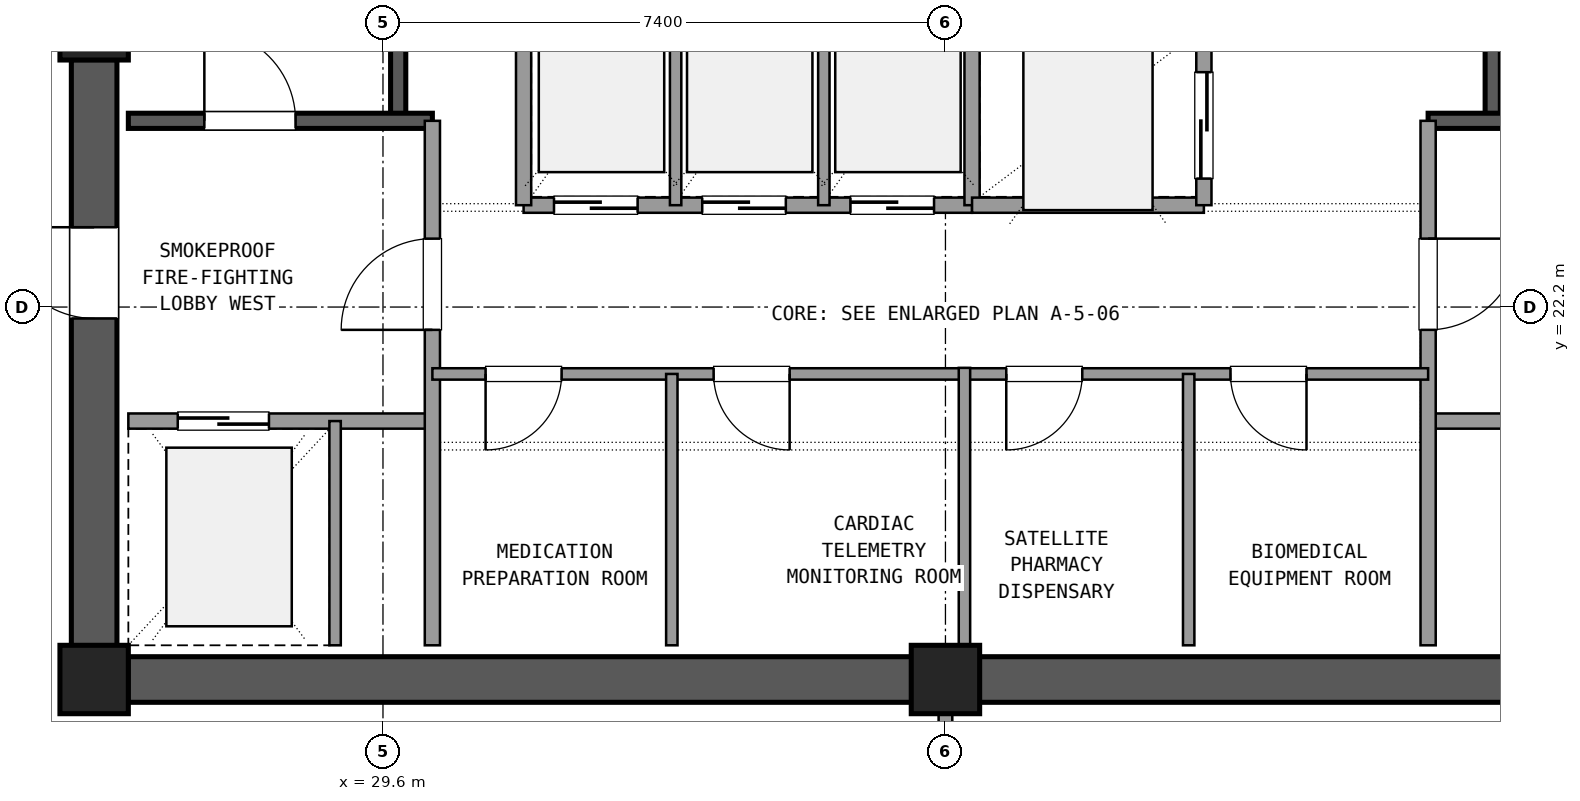
"""IFC4 building model, lengths in metres.
Left out: names, types, materials, properties, quantities, classifications, styles, units other than length and angle.
Written with IfcOpenShell. Run it as: python <this file> out.ifc"""

import sys

from ifc_helpers import new_model, si_unit, direction, frame, frame_2d, origin, origin_2d, place, context, subcontext, project, spatial, rectangle, extrude, element, fill, save


model = new_model("IFC4")
c1 = context("Model", 3, precision=1e-05, world=origin(), true_north=direction((0.0, 1.0)))
c2 = subcontext(c1, "Body", "Model", "MODEL_VIEW")
j1 = project(units=[si_unit("LENGTHUNIT", "METRE"), si_unit("PLANEANGLEUNIT", "RADIAN")], contexts=[c1])
p1 = place(None, origin())
s1 = spatial("IfcSite", under=j1, at=p1, CompositionType="ELEMENT")
p2 = place(p1, origin())
s2 = spatial("IfcBuilding", under=s1, at=p2, CompositionType="ELEMENT")
p3 = place(p2, frame((0.0, 0.0, 228.78)))
s3 = spatial("IfcBuildingStorey", under=s2, at=p3, CompositionType="ELEMENT", Elevation=228.78)
for number, where, z_axis, x_axis in (
    (1, (25.8, 17.3, 0.0), (0.0, 0.0, 1.0), (1.0, 0.0, 0.0)),
    (2, (37.0, 17.3, 0.0), (0.0, 0.0, 1.0), (1.0, 0.0, 0.0)),
    (3, (25.8, 25.9, 0.0), (0.0, 0.0, 1.0), (1.0, 0.0, 0.0)),
):
    element("IfcColumn", number, at=place(p3, frame(where, z_axis=z_axis, x_axis=x_axis)), inside=s3, PredefinedType="COLUMN", context=c2, shape_type="SweptSolid", body=[
        extrude(rectangle(XDim=0.9, YDim=0.9, at=origin_2d()), origin(), (0.0, 0.0, 1.0), 3.6),
    ])
for number, where, z_axis, x_axis in (
    (4, (26.245, 17.3, 0.0), (0.0, 0.0, 1.0), (1.0, 0.0, 0.0)),
    (5, (37.445, 17.3, 0.0), (0.0, 0.0, 1.0), (1.0, 0.0, 0.0)),
):
    element("IfcWall", number, at=place(p3, frame(where, z_axis=z_axis, x_axis=x_axis)), inside=s3, PredefinedType="SHEAR", context=c2, shape_type="SweptSolid", body=[
        extrude(rectangle(XDim=10.31, YDim=0.6, at=frame_2d((5.155, 0.0))), origin(), (0.0, 0.0, 1.0), 3.3),
    ])
p4 = place(p3, frame((25.8, 25.455, 0.0), z_axis=(0.0, 0.0, 1.0), x_axis=(0.0, -1.0, 0.0)))
e6 = element("IfcWall", 6, at=p4, inside=s3, PredefinedType="SHEAR", context=c2, shape_type="SweptSolid", body=[
    extrude(rectangle(XDim=7.71, YDim=0.6, at=frame_2d((3.855, 0.0))), origin(), (0.0, 0.0, 1.0), 3.3),
])
p5 = place(p4, frame((2.205, 0.0, 0.0)))
e7 = element("IfcOpeningElement", 7, at=p5, cuts=e6, PredefinedType="OPENING", context=c2, shape_type="SweptSolid", body=[
    extrude(rectangle(XDim=1.2, YDim=2.15, at=frame_2d((0.6, 1.075))), frame((0.0, 0.31, 0.0), z_axis=(0.0, -1.0, 0.0), x_axis=(1.0, 0.0, 0.0)), (0.0, 0.0, 1.0), 0.62),
])
p6 = place(p3, frame((29.8, 24.65, 0.0), z_axis=(0.0, 0.0, 1.0), x_axis=(0.0, 1.0, 0.0)))
e8 = element("IfcWall", 8, at=p6, inside=s3, PredefinedType="SHEAR", context=c2, shape_type="SweptSolid", body=[
    extrude(rectangle(XDim=9.4, YDim=0.2, at=frame_2d((4.7, 0.0))), origin(), (0.0, 0.0, 1.0), 3.3),
])
p7 = place(p3, frame((26.25, 24.65, 0.0), z_axis=(0.0, 0.0, 1.0), x_axis=(1.0, 0.0, 0.0)))
e9 = element("IfcWall", 9, at=p7, inside=s3, PredefinedType="SHEAR", context=c2, shape_type="SweptSolid", body=[
    extrude(rectangle(XDim=4.0, YDim=0.2, at=frame_2d((2.0, 0.0))), origin(), (0.0, 0.0, 1.0), 3.3),
])
p8 = place(p7, frame((1.0, 0.0, 0.0)))
e10 = element("IfcOpeningElement", 10, at=p8, cuts=e9, PredefinedType="OPENING", context=c2, shape_type="SweptSolid", body=[
    extrude(rectangle(XDim=1.2, YDim=2.15, at=frame_2d((0.6, 1.075))), frame((0.0, 0.11, 0.0), z_axis=(0.0, -1.0, 0.0), x_axis=(1.0, 0.0, 0.0)), (0.0, 0.0, 1.0), 0.22),
])
p9 = place(p3, frame((44.2, 24.65, 0.0), z_axis=(0.0, 0.0, 1.0), x_axis=(0.0, 1.0, 0.0)))
e11 = element("IfcWall", 11, at=p9, inside=s3, PredefinedType="SHEAR", context=c2, shape_type="SweptSolid", body=[
    extrude(rectangle(XDim=9.4, YDim=0.2, at=frame_2d((4.7, 0.0))), origin(), (0.0, 0.0, 1.0), 3.3),
])
p10 = place(p3, frame((43.35, 24.65, 0.0), z_axis=(0.0, 0.0, 1.0), x_axis=(1.0, 0.0, 0.0)))
e12 = element("IfcWall", 12, at=p10, inside=s3, PredefinedType="SHEAR", context=c2, shape_type="SweptSolid", body=[
    extrude(rectangle(XDim=4.4, YDim=0.2, at=frame_2d((2.2, 0.0))), origin(), (0.0, 0.0, 1.0), 3.3),
])
p11 = place(p10, frame((2.0, 0.0, 0.0)))
e13 = element("IfcOpeningElement", 13, at=p11, cuts=e12, PredefinedType="OPENING", context=c2, shape_type="SweptSolid", body=[
    extrude(rectangle(XDim=1.2, YDim=2.15, at=frame_2d((0.6, 1.075))), frame((0.0, 0.11, 0.0), z_axis=(0.0, -1.0, 0.0), x_axis=(1.0, 0.0, 0.0)), (0.0, 0.0, 1.0), 0.22),
])
p12 = place(p3, frame((26.25, 20.7, 0.0), z_axis=(0.0, 0.0, 1.0), x_axis=(1.0, 0.0, 0.0)))
e14 = element("IfcWall", 14, at=p12, inside=s3, PredefinedType="SOLIDWALL", context=c2, shape_type="SweptSolid", body=[
    extrude(rectangle(XDim=4.0, YDim=0.2, at=frame_2d((2.0, 0.0))), origin(), (0.0, 0.0, 1.0), 2.59),
])
p13 = place(p12, frame((0.65, 0.0, 0.0)))
e15 = element("IfcOpeningElement", 15, at=p13, cuts=e14, PredefinedType="OPENING", context=c2, shape_type="SweptSolid", body=[
    extrude(rectangle(XDim=1.2, YDim=2.15, at=frame_2d((0.6, 1.075))), frame((0.0, 0.11, 0.0), z_axis=(0.0, -1.0, 0.0), x_axis=(1.0, 0.0, 0.0)), (0.0, 0.0, 1.0), 0.22),
])
p14 = place(p3, frame((30.25, 17.75, 0.0), z_axis=(0.0, 0.0, 1.0), x_axis=(0.0, 1.0, 0.0)))
e16 = element("IfcWall", 16, at=p14, inside=s3, PredefinedType="SOLIDWALL", context=c2, shape_type="SweptSolid", body=[
    extrude(rectangle(XDim=6.9, YDim=0.2, at=frame_2d((3.45, 0.0))), origin(), (0.0, 0.0, 1.0), 2.59),
])
p15 = place(p14, frame((4.15, 0.0, 0.0)))
e17 = element("IfcOpeningElement", 17, at=p15, cuts=e16, PredefinedType="OPENING", context=c2, shape_type="SweptSolid", body=[
    extrude(rectangle(XDim=1.2, YDim=2.15, at=frame_2d((0.6, 1.075))), frame((0.0, 0.11, 0.0), z_axis=(0.0, -1.0, 0.0), x_axis=(1.0, 0.0, 0.0)), (0.0, 0.0, 1.0), 0.22),
])
p16 = place(p3, frame((28.97, 17.75, 0.0), z_axis=(0.0, 0.0, 1.0), x_axis=(0.0, 1.0, 0.0)))
e18 = element("IfcWall", 18, at=p16, inside=s3, PredefinedType="PARTITIONING", context=c2, shape_type="SweptSolid", body=[
    extrude(rectangle(XDim=2.95, YDim=0.15, at=frame_2d((1.475, 0.0))), origin(), (0.0, 0.0, 1.0), 2.59),
])
p17 = place(p3, frame((43.35, 20.7, 0.0), z_axis=(0.0, 0.0, 1.0), x_axis=(1.0, 0.0, 0.0)))
e19 = element("IfcWall", 19, at=p17, inside=s3, PredefinedType="SOLIDWALL", context=c2, shape_type="SweptSolid", body=[
    extrude(rectangle(XDim=4.4, YDim=0.2, at=frame_2d((2.2, 0.0))), origin(), (0.0, 0.0, 1.0), 2.59),
])
p18 = place(p17, frame((2.35, 0.0, 0.0)))
e20 = element("IfcOpeningElement", 20, at=p18, cuts=e19, PredefinedType="OPENING", context=c2, shape_type="SweptSolid", body=[
    extrude(rectangle(XDim=1.2, YDim=2.15, at=frame_2d((0.6, 1.075))), frame((0.0, 0.11, 0.0), z_axis=(0.0, -1.0, 0.0), x_axis=(1.0, 0.0, 0.0)), (0.0, 0.0, 1.0), 0.22),
])
p19 = place(p3, frame((43.35, 17.75, 0.0), z_axis=(0.0, 0.0, 1.0), x_axis=(0.0, 1.0, 0.0)))
e21 = element("IfcWall", 21, at=p19, inside=s3, PredefinedType="SOLIDWALL", context=c2, shape_type="SweptSolid", body=[
    extrude(rectangle(XDim=6.9, YDim=0.2, at=frame_2d((3.45, 0.0))), origin(), (0.0, 0.0, 1.0), 2.59),
])
p20 = place(p19, frame((4.15, 0.0, 0.0)))
e22 = element("IfcOpeningElement", 22, at=p20, cuts=e21, PredefinedType="OPENING", context=c2, shape_type="SweptSolid", body=[
    extrude(rectangle(XDim=1.2, YDim=2.15, at=frame_2d((0.6, 1.075))), frame((0.0, 0.11, 0.0), z_axis=(0.0, -1.0, 0.0), x_axis=(1.0, 0.0, 0.0)), (0.0, 0.0, 1.0), 0.22),
])
p21 = place(p3, frame((30.25, 21.32, 0.0), z_axis=(0.0, 0.0, 1.0), x_axis=(1.0, 0.0, 0.0)))
e23 = element("IfcWall", 23, at=p21, inside=s3, PredefinedType="PARTITIONING", context=c2, shape_type="SweptSolid", body=[
    extrude(rectangle(XDim=7.0, YDim=0.15, at=frame_2d((3.5, 0.0))), origin(), (0.0, 0.0, 1.0), 2.59),
])
p22 = place(p21, frame((0.7, 0.0, 0.0)))
e24 = element("IfcOpeningElement", 24, at=p22, cuts=e23, PredefinedType="OPENING", context=c2, shape_type="SweptSolid", body=[
    extrude(rectangle(XDim=1.0, YDim=2.15, at=frame_2d((0.5, 1.075))), frame((0.0, 0.085, 0.0), z_axis=(0.0, -1.0, 0.0), x_axis=(1.0, 0.0, 0.0)), (0.0, 0.0, 1.0), 0.17),
])
p23 = place(p21, frame((3.7, 0.0, 0.0)))
e25 = element("IfcOpeningElement", 25, at=p23, cuts=e23, PredefinedType="OPENING", context=c2, shape_type="SweptSolid", body=[
    extrude(rectangle(XDim=1.0, YDim=2.15, at=frame_2d((0.5, 1.075))), frame((0.0, 0.085, 0.0), z_axis=(0.0, -1.0, 0.0), x_axis=(1.0, 0.0, 0.0)), (0.0, 0.0, 1.0), 0.17),
])
p24 = place(p3, frame((33.4, 17.75, 0.0), z_axis=(0.0, 0.0, 1.0), x_axis=(0.0, 1.0, 0.0)))
e26 = element("IfcWall", 26, at=p24, inside=s3, PredefinedType="PARTITIONING", context=c2, shape_type="SweptSolid", body=[
    extrude(rectangle(XDim=3.57, YDim=0.15, at=frame_2d((1.785, 0.0))), origin(), (0.0, 0.0, 1.0), 2.59),
])
p25 = place(p3, frame((37.25, 21.32, 0.0), z_axis=(0.0, 0.0, 1.0), x_axis=(1.0, 0.0, 0.0)))
e27 = element("IfcWall", 27, at=p25, inside=s3, PredefinedType="PARTITIONING", context=c2, shape_type="SweptSolid", body=[
    extrude(rectangle(XDim=6.1, YDim=0.15, at=frame_2d((3.05, 0.0))), origin(), (0.0, 0.0, 1.0), 2.59),
])
p26 = place(p25, frame((0.55, 0.0, 0.0)))
e28 = element("IfcOpeningElement", 28, at=p26, cuts=e27, PredefinedType="OPENING", context=c2, shape_type="SweptSolid", body=[
    extrude(rectangle(XDim=1.0, YDim=2.15, at=frame_2d((0.5, 1.075))), frame((0.0, 0.085, 0.0), z_axis=(0.0, -1.0, 0.0), x_axis=(1.0, 0.0, 0.0)), (0.0, 0.0, 1.0), 0.17),
])
p27 = place(p25, frame((3.5, 0.0, 0.0)))
e29 = element("IfcOpeningElement", 29, at=p27, cuts=e27, PredefinedType="OPENING", context=c2, shape_type="SweptSolid", body=[
    extrude(rectangle(XDim=1.0, YDim=2.15, at=frame_2d((0.5, 1.075))), frame((0.0, 0.085, 0.0), z_axis=(0.0, -1.0, 0.0), x_axis=(1.0, 0.0, 0.0)), (0.0, 0.0, 1.0), 0.17),
])
p28 = place(p3, frame((40.2, 17.75, 0.0), z_axis=(0.0, 0.0, 1.0), x_axis=(0.0, 1.0, 0.0)))
e30 = element("IfcWall", 30, at=p28, inside=s3, PredefinedType="PARTITIONING", context=c2, shape_type="SweptSolid", body=[
    extrude(rectangle(XDim=3.57, YDim=0.15, at=frame_2d((1.785, 0.0))), origin(), (0.0, 0.0, 1.0), 2.59),
])
p29 = place(p3, frame((37.25, 17.75, 0.0), z_axis=(0.0, 0.0, 1.0), x_axis=(0.0, 1.0, 0.0)))
e31 = element("IfcWall", 31, at=p29, inside=s3, PredefinedType="PARTITIONING", context=c2, shape_type="SweptSolid", body=[
    extrude(rectangle(XDim=3.65, YDim=0.15, at=frame_2d((1.825, 0.0))), origin(), (0.0, 0.0, 1.0), 2.59),
])
p30 = place(p3, frame((31.45, 23.54, 0.0), z_axis=(0.0, 0.0, 1.0), x_axis=(1.0, 0.0, 0.0)))
e32 = element("IfcWall", 32, at=p30, inside=s3, PredefinedType="SOLIDWALL", context=c2, shape_type="SweptSolid", body=[
    extrude(rectangle(XDim=5.9, YDim=0.2, at=frame_2d((2.95, 0.0))), origin(), (0.0, 0.0, 1.0), 2.59),
])
p31 = place(p30, frame((0.4, 0.0, 0.0)))
e33 = element("IfcOpeningElement", 33, at=p31, cuts=e32, PredefinedType="OPENING", context=c2, shape_type="SweptSolid", body=[
    extrude(rectangle(XDim=1.1, YDim=2.15, at=frame_2d((0.55, 1.075))), frame((0.0, 0.11, 0.0), z_axis=(0.0, -1.0, 0.0), x_axis=(1.0, 0.0, 0.0)), (0.0, 0.0, 1.0), 0.22),
])
p32 = place(p30, frame((2.35, 0.0, 0.0)))
e34 = element("IfcOpeningElement", 34, at=p32, cuts=e32, PredefinedType="OPENING", context=c2, shape_type="SweptSolid", body=[
    extrude(rectangle(XDim=1.1, YDim=2.15, at=frame_2d((0.55, 1.075))), frame((0.0, 0.11, 0.0), z_axis=(0.0, -1.0, 0.0), x_axis=(1.0, 0.0, 0.0)), (0.0, 0.0, 1.0), 0.22),
])
p33 = place(p30, frame((4.3, 0.0, 0.0)))
e35 = element("IfcOpeningElement", 35, at=p33, cuts=e32, PredefinedType="OPENING", context=c2, shape_type="SweptSolid", body=[
    extrude(rectangle(XDim=1.1, YDim=2.15, at=frame_2d((0.55, 1.075))), frame((0.0, 0.11, 0.0), z_axis=(0.0, -1.0, 0.0), x_axis=(1.0, 0.0, 0.0)), (0.0, 0.0, 1.0), 0.22),
])
p34 = place(p3, frame((31.45, 23.54, 0.0), z_axis=(0.0, 0.0, 1.0), x_axis=(0.0, 1.0, 0.0)))
e36 = element("IfcWall", 36, at=p34, inside=s3, PredefinedType="SOLIDWALL", context=c2, shape_type="SweptSolid", body=[
    extrude(rectangle(XDim=2.81, YDim=0.2, at=frame_2d((1.405, 0.0))), origin(), (0.0, 0.0, 1.0), 2.59),
])
for number, where, z_axis, x_axis in (
    (37, (33.45, 23.54, 0.0), (0.0, 0.0, 1.0), (0.0, 1.0, 0.0)),
    (38, (35.4, 23.54, 0.0), (0.0, 0.0, 1.0), (0.0, 1.0, 0.0)),
):
    element("IfcWall", number, at=place(p3, frame(where, z_axis=z_axis, x_axis=x_axis)), inside=s3, PredefinedType="PARTITIONING", context=c2, shape_type="SweptSolid", body=[
        extrude(rectangle(XDim=2.81, YDim=0.15, at=frame_2d((1.405, 0.0))), origin(), (0.0, 0.0, 1.0), 2.59),
    ])
p35 = place(p3, frame((37.35, 23.54, 0.0), z_axis=(0.0, 0.0, 1.0), x_axis=(0.0, 1.0, 0.0)))
e39 = element("IfcWall", 39, at=p35, inside=s3, PredefinedType="SOLIDWALL", context=c2, shape_type="SweptSolid", body=[
    extrude(rectangle(XDim=6.82, YDim=0.2, at=frame_2d((3.41, 0.0))), origin(), (0.0, 0.0, 1.0), 2.59),
])
p36 = place(p3, frame((37.35, 23.54, 0.0), z_axis=(0.0, 0.0, 1.0), x_axis=(1.0, 0.0, 0.0)))
e40 = element("IfcWall", 40, at=p36, inside=s3, PredefinedType="SOLIDWALL", context=c2, shape_type="SweptSolid", body=[
    extrude(rectangle(XDim=3.05, YDim=0.2, at=frame_2d((1.525, 0.0))), origin(), (0.0, 0.0, 1.0), 2.59),
])
p37 = place(p3, frame((40.4, 23.54, 0.0), z_axis=(0.0, 0.0, 1.0), x_axis=(0.0, 1.0, 0.0)))
e41 = element("IfcWall", 41, at=p37, inside=s3, PredefinedType="SOLIDWALL", context=c2, shape_type="SweptSolid", body=[
    extrude(rectangle(XDim=6.82, YDim=0.2, at=frame_2d((3.41, 0.0))), origin(), (0.0, 0.0, 1.0), 2.59),
])
p38 = place(p37, frame((0.35, 0.0, 0.0)))
e42 = element("IfcOpeningElement", 42, at=p38, cuts=e41, PredefinedType="OPENING", context=c2, shape_type="SweptSolid", body=[
    extrude(rectangle(XDim=1.4, YDim=2.2, at=frame_2d((0.7, 1.1))), frame((0.0, 0.11, 0.0), z_axis=(0.0, -1.0, 0.0), x_axis=(1.0, 0.0, 0.0)), (0.0, 0.0, 1.0), 0.22),
])
p39 = place(p37, frame((2.65, 0.0, 0.0)))
e43 = element("IfcOpeningElement", 43, at=p39, cuts=e41, PredefinedType="OPENING", context=c2, shape_type="SweptSolid", body=[
    extrude(rectangle(XDim=1.4, YDim=2.2, at=frame_2d((0.7, 1.1))), frame((0.0, 0.11, 0.0), z_axis=(0.0, -1.0, 0.0), x_axis=(1.0, 0.0, 0.0)), (0.0, 0.0, 1.0), 0.22),
])
p40 = place(p37, frame((4.85, 0.0, 0.0)))
e44 = element("IfcOpeningElement", 44, at=p40, cuts=e41, PredefinedType="OPENING", context=c2, shape_type="SweptSolid", body=[
    extrude(rectangle(XDim=1.4, YDim=2.2, at=frame_2d((0.7, 1.1))), frame((0.0, 0.11, 0.0), z_axis=(0.0, -1.0, 0.0), x_axis=(1.0, 0.0, 0.0)), (0.0, 0.0, 1.0), 0.22),
])
p41 = place(p3, frame((37.0, 14.15, 0.0), z_axis=(0.0, 0.0, 1.0), x_axis=(0.0, 1.0, 0.0)))
e45 = element("IfcWall", 45, at=p41, inside=s3, PredefinedType="PARTITIONING", context=c2, shape_type="SweptSolid", body=[
    extrude(rectangle(XDim=2.7, YDim=0.18, at=frame_2d((1.35, 0.0))), origin(), (0.0, 0.0, 1.0), 2.59),
])
p42 = place(p41, frame((0.35, 0.0, 0.0)))
e46 = element("IfcOpeningElement", 46, at=p42, cuts=e45, PredefinedType="OPENING", context=c2, shape_type="SweptSolid", body=[
    extrude(rectangle(XDim=2.0, YDim=2.2, at=frame_2d((1.0, 1.1))), frame((0.0, 0.1, 0.0), z_axis=(0.0, -1.0, 0.0), x_axis=(1.0, 0.0, 0.0)), (0.0, 0.0, 1.0), 0.2),
])
p43 = place(p8, origin())
e47 = element("IfcDoor", 47, at=p43, inside=s3, OperationType="SINGLE_SWING_LEFT", PredefinedType="DOOR", context=c2, shape_type="SweptSolid", body=[
    extrude(rectangle(XDim=1.2, YDim=2.15, at=frame_2d((0.6, 1.075))), frame((0.0, 0.025, 0.0), z_axis=(0.0, -1.0, 0.0), x_axis=(1.0, 0.0, 0.0)), (0.0, 0.0, 1.0), 0.05),
])
fill(e10, e47)
p44 = place(p13, origin())
e48 = element("IfcDoor", 48, at=p44, inside=s3, OperationType="SLIDING_TO_LEFT", PredefinedType="DOOR", context=c2, shape_type="SweptSolid", body=[
    extrude(rectangle(XDim=1.2, YDim=2.15, at=frame_2d((0.6, 1.075))), frame((0.0, 0.025, 0.0), z_axis=(0.0, -1.0, 0.0), x_axis=(1.0, 0.0, 0.0)), (0.0, 0.0, 1.0), 0.05),
])
fill(e15, e48)
p45 = place(p15, origin())
e49 = element("IfcDoor", 49, at=p45, inside=s3, OperationType="SINGLE_SWING_LEFT", PredefinedType="DOOR", context=c2, shape_type="SweptSolid", body=[
    extrude(rectangle(XDim=1.2, YDim=2.15, at=frame_2d((0.6, 1.075))), frame((0.0, 0.025, 0.0), z_axis=(0.0, -1.0, 0.0), x_axis=(1.0, 0.0, 0.0)), (0.0, 0.0, 1.0), 0.05),
])
fill(e17, e49)
p46 = place(p20, frame((1.2, 0.0, 0.0), z_axis=(0.0, 0.0, 1.0), x_axis=(-1.0, 0.0, 0.0)))
e50 = element("IfcDoor", 50, at=p46, inside=s3, OperationType="SINGLE_SWING_RIGHT", PredefinedType="DOOR", context=c2, shape_type="SweptSolid", body=[
    extrude(rectangle(XDim=1.2, YDim=2.15, at=frame_2d((0.6, 1.075))), frame((0.0, 0.025, 0.0), z_axis=(0.0, -1.0, 0.0), x_axis=(1.0, 0.0, 0.0)), (0.0, 0.0, 1.0), 0.05),
])
fill(e22, e50)
p47 = place(p5, frame((1.2, 0.0, 0.0), z_axis=(0.0, 0.0, 1.0), x_axis=(-1.0, 0.0, 0.0)))
e51 = element("IfcDoor", 51, at=p47, inside=s3, OperationType="SINGLE_SWING_LEFT", PredefinedType="DOOR", context=c2, shape_type="SweptSolid", body=[
    extrude(rectangle(XDim=1.2, YDim=2.15, at=frame_2d((0.6, 1.075))), frame((0.0, 0.025, 0.0), z_axis=(0.0, -1.0, 0.0), x_axis=(1.0, 0.0, 0.0)), (0.0, 0.0, 1.0), 0.05),
])
fill(e7, e51)
p48 = place(p22, frame((1.0, 0.0, 0.0), z_axis=(0.0, 0.0, 1.0), x_axis=(-1.0, 0.0, 0.0)))
e52 = element("IfcDoor", 52, at=p48, inside=s3, OperationType="SINGLE_SWING_LEFT", PredefinedType="DOOR", context=c2, shape_type="SweptSolid", body=[
    extrude(rectangle(XDim=1.0, YDim=2.15, at=frame_2d((0.5, 1.075))), frame((0.0, 0.025, 0.0), z_axis=(0.0, -1.0, 0.0), x_axis=(1.0, 0.0, 0.0)), (0.0, 0.0, 1.0), 0.05),
])
fill(e24, e52)
p49 = place(p23, frame((1.0, 0.0, 0.0), z_axis=(0.0, 0.0, 1.0), x_axis=(-1.0, 0.0, 0.0)))
e53 = element("IfcDoor", 53, at=p49, inside=s3, OperationType="SINGLE_SWING_RIGHT", PredefinedType="DOOR", context=c2, shape_type="SweptSolid", body=[
    extrude(rectangle(XDim=1.0, YDim=2.15, at=frame_2d((0.5, 1.075))), frame((0.0, 0.025, 0.0), z_axis=(0.0, -1.0, 0.0), x_axis=(1.0, 0.0, 0.0)), (0.0, 0.0, 1.0), 0.05),
])
fill(e25, e53)
p50 = place(p26, frame((1.0, 0.0, 0.0), z_axis=(0.0, 0.0, 1.0), x_axis=(-1.0, 0.0, 0.0)))
e54 = element("IfcDoor", 54, at=p50, inside=s3, OperationType="SINGLE_SWING_LEFT", PredefinedType="DOOR", context=c2, shape_type="SweptSolid", body=[
    extrude(rectangle(XDim=1.0, YDim=2.15, at=frame_2d((0.5, 1.075))), frame((0.0, 0.025, 0.0), z_axis=(0.0, -1.0, 0.0), x_axis=(1.0, 0.0, 0.0)), (0.0, 0.0, 1.0), 0.05),
])
fill(e28, e54)
p51 = place(p27, frame((1.0, 0.0, 0.0), z_axis=(0.0, 0.0, 1.0), x_axis=(-1.0, 0.0, 0.0)))
e55 = element("IfcDoor", 55, at=p51, inside=s3, OperationType="SINGLE_SWING_RIGHT", PredefinedType="DOOR", context=c2, shape_type="SweptSolid", body=[
    extrude(rectangle(XDim=1.0, YDim=2.15, at=frame_2d((0.5, 1.075))), frame((0.0, 0.025, 0.0), z_axis=(0.0, -1.0, 0.0), x_axis=(1.0, 0.0, 0.0)), (0.0, 0.0, 1.0), 0.05),
])
fill(e29, e55)
p52 = place(p31, origin())
e56 = element("IfcDoor", 56, at=p52, inside=s3, OperationType="SLIDING_TO_RIGHT", PredefinedType="DOOR", context=c2, shape_type="SweptSolid", body=[
    extrude(rectangle(XDim=1.1, YDim=2.15, at=frame_2d((0.55, 1.075))), frame((0.0, 0.025, 0.0), z_axis=(0.0, -1.0, 0.0), x_axis=(1.0, 0.0, 0.0)), (0.0, 0.0, 1.0), 0.05),
])
fill(e33, e56)
p53 = place(p32, origin())
e57 = element("IfcDoor", 57, at=p53, inside=s3, OperationType="SLIDING_TO_RIGHT", PredefinedType="DOOR", context=c2, shape_type="SweptSolid", body=[
    extrude(rectangle(XDim=1.1, YDim=2.15, at=frame_2d((0.55, 1.075))), frame((0.0, 0.025, 0.0), z_axis=(0.0, -1.0, 0.0), x_axis=(1.0, 0.0, 0.0)), (0.0, 0.0, 1.0), 0.05),
])
fill(e34, e57)
p54 = place(p33, origin())
e58 = element("IfcDoor", 58, at=p54, inside=s3, OperationType="SLIDING_TO_RIGHT", PredefinedType="DOOR", context=c2, shape_type="SweptSolid", body=[
    extrude(rectangle(XDim=1.1, YDim=2.15, at=frame_2d((0.55, 1.075))), frame((0.0, 0.025, 0.0), z_axis=(0.0, -1.0, 0.0), x_axis=(1.0, 0.0, 0.0)), (0.0, 0.0, 1.0), 0.05),
])
fill(e35, e58)
p55 = place(p38, origin())
e59 = element("IfcDoor", 59, at=p55, inside=s3, OperationType="SLIDING_TO_LEFT", PredefinedType="DOOR", context=c2, shape_type="SweptSolid", body=[
    extrude(rectangle(XDim=1.4, YDim=2.2, at=frame_2d((0.7, 1.1))), frame((0.0, 0.025, 0.0), z_axis=(0.0, -1.0, 0.0), x_axis=(1.0, 0.0, 0.0)), (0.0, 0.0, 1.0), 0.05),
])
fill(e42, e59)
save(model, sys.argv[1])
